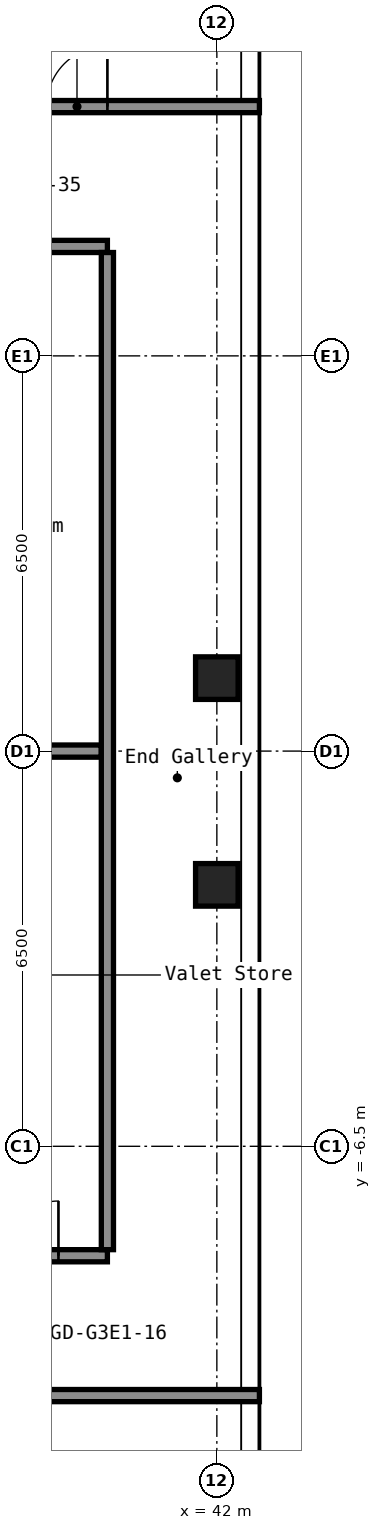
"""IFC4 building model, lengths in metres.
Left out: names, types, materials, properties, quantities, classifications, styles, units other than length and angle.
Written with IfcOpenShell. Run it as: python <this file> out.ifc"""

import sys

from ifc_helpers import new_model, si_unit, direction, frame, frame_2d, origin, origin_2d, place, context, subcontext, project, spatial, rectangle, hollow_rectangle, extrude, element, fill, save


model = new_model("IFC4")
c1 = context("Model", 3, precision=1e-05, world=origin(), true_north=direction((0.0, 1.0)))
c2 = subcontext(c1, "Body", "Model", "MODEL_VIEW")
j1 = project(units=[si_unit("LENGTHUNIT", "METRE"), si_unit("PLANEANGLEUNIT", "RADIAN")], contexts=[c1])
p1 = place(None, origin())
s1 = spatial("IfcSite", under=j1, at=p1, CompositionType="ELEMENT")
p2 = place(p1, origin())
s2 = spatial("IfcBuilding", under=s1, at=p2, CompositionType="ELEMENT")
p3 = place(p2, frame((0.0, 0.0, 159.8)))
s3 = spatial("IfcBuildingStorey", under=s2, at=p3, CompositionType="ELEMENT", Elevation=159.8)
for number, where, z_axis, x_axis in (
    (1, (42.0, -2.2, 0.0), (0.0, 0.0, 1.0), (1.0, 0.0, 0.0)),
    (2, (42.0, 1.2, 0.0), (0.0, 0.0, 1.0), (1.0, 0.0, 0.0)),
):
    element("IfcColumn", number, at=place(p3, frame(where, z_axis=z_axis, x_axis=x_axis)), inside=s3, PredefinedType="COLUMN", context=c2, shape_type="SweptSolid", body=[
        extrude(hollow_rectangle(XDim=0.7, YDim=0.7, WallThickness=0.028, at=origin_2d()), origin(), (0.0, 0.0, 1.0), 2.75),
    ])
p4 = place(p3, frame((16.8, -10.6, 0.0), z_axis=(0.0, 0.0, 1.0), x_axis=(1.0, 0.0, 0.0)))
e3 = element("IfcWall", 3, at=p4, inside=s3, PredefinedType="PARTITIONING", context=c2, shape_type="SweptSolid", body=[
    extrude(rectangle(XDim=25.9, YDim=0.2, at=frame_2d((12.95, 0.0))), origin(), (0.0, 0.0, 1.0), 2.75),
])
p5 = place(p4, frame((3.4, 0.0, 0.0)))
e4 = element("IfcOpeningElement", 4, at=p5, cuts=e3, PredefinedType="OPENING", context=c2, shape_type="SweptSolid", body=[
    extrude(rectangle(XDim=1.6, YDim=2.1, at=frame_2d((0.8, 1.05))), frame((0.0, 0.11, 0.0), z_axis=(0.0, -1.0, 0.0), x_axis=(1.0, 0.0, 0.0)), (0.0, 0.0, 1.0), 0.22),
])
p6 = place(p4, frame((11.8, 0.0, 0.0)))
e5 = element("IfcOpeningElement", 5, at=p6, cuts=e3, PredefinedType="OPENING", context=c2, shape_type="SweptSolid", body=[
    extrude(rectangle(XDim=1.6, YDim=2.1, at=frame_2d((0.8, 1.05))), frame((0.0, 0.11, 0.0), z_axis=(0.0, -1.0, 0.0), x_axis=(1.0, 0.0, 0.0)), (0.0, 0.0, 1.0), 0.22),
])
p7 = place(p4, frame((20.4, 0.0, 0.0)))
e6 = element("IfcOpeningElement", 6, at=p7, cuts=e3, PredefinedType="OPENING", context=c2, shape_type="SweptSolid", body=[
    extrude(rectangle(XDim=1.6, YDim=2.1, at=frame_2d((0.8, 1.05))), frame((0.0, 0.11, 0.0), z_axis=(0.0, -1.0, 0.0), x_axis=(1.0, 0.0, 0.0)), (0.0, 0.0, 1.0), 0.22),
])
p8 = place(p3, frame((33.6, -8.3, 0.0), z_axis=(0.0, 0.0, 1.0), x_axis=(1.0, 0.0, 0.0)))
e7 = element("IfcWall", 7, at=p8, inside=s3, PredefinedType="PARTITIONING", context=c2, shape_type="SweptSolid", body=[
    extrude(rectangle(XDim=6.6, YDim=0.2, at=frame_2d((3.3, 0.0))), origin(), (0.0, 0.0, 1.0), 2.75),
])
p9 = place(p8, frame((1.595, 0.0, 0.0)))
e8 = element("IfcOpeningElement", 8, at=p9, cuts=e7, PredefinedType="OPENING", context=c2, shape_type="SweptSolid", body=[
    extrude(rectangle(XDim=0.9, YDim=2.1, at=frame_2d((0.45, 1.05))), frame((0.0, 0.11, 0.0), z_axis=(0.0, -1.0, 0.0), x_axis=(1.0, 0.0, 0.0)), (0.0, 0.0, 1.0), 0.22),
])
p10 = place(p8, frame((4.895, 0.0, 0.0)))
e9 = element("IfcOpeningElement", 9, at=p10, cuts=e7, PredefinedType="OPENING", context=c2, shape_type="SweptSolid", body=[
    extrude(rectangle(XDim=0.9, YDim=2.1, at=frame_2d((0.45, 1.05))), frame((0.0, 0.11, 0.0), z_axis=(0.0, -1.0, 0.0), x_axis=(1.0, 0.0, 0.0)), (0.0, 0.0, 1.0), 0.22),
])
p11 = place(p3, frame((33.6, 0.0, 0.0), z_axis=(0.0, 0.0, 1.0), x_axis=(1.0, 0.0, 0.0)))
e10 = element("IfcWall", 10, at=p11, inside=s3, PredefinedType="PARTITIONING", context=c2, shape_type="SweptSolid", body=[
    extrude(rectangle(XDim=6.5, YDim=0.2, at=frame_2d((3.25, 0.0))), origin(), (0.0, 0.0, 1.0), 2.75),
])
p12 = place(p3, frame((33.6, 8.3, 0.0), z_axis=(0.0, 0.0, 1.0), x_axis=(1.0, 0.0, 0.0)))
e11 = element("IfcWall", 11, at=p12, inside=s3, PredefinedType="PARTITIONING", context=c2, shape_type="SweptSolid", body=[
    extrude(rectangle(XDim=6.6, YDim=0.2, at=frame_2d((3.3, 0.0))), origin(), (0.0, 0.0, 1.0), 2.75),
])
p13 = place(p12, frame((1.465, 0.0, 0.0)))
e12 = element("IfcOpeningElement", 12, at=p13, cuts=e11, PredefinedType="OPENING", context=c2, shape_type="SweptSolid", body=[
    extrude(rectangle(XDim=0.9, YDim=2.1, at=frame_2d((0.45, 1.05))), frame((0.0, 0.11, 0.0), z_axis=(0.0, -1.0, 0.0), x_axis=(1.0, 0.0, 0.0)), (0.0, 0.0, 1.0), 0.22),
])
p14 = place(p12, frame((4.765, 0.0, 0.0)))
e13 = element("IfcOpeningElement", 13, at=p14, cuts=e11, PredefinedType="OPENING", context=c2, shape_type="SweptSolid", body=[
    extrude(rectangle(XDim=0.9, YDim=2.1, at=frame_2d((0.45, 1.05))), frame((0.0, 0.11, 0.0), z_axis=(0.0, -1.0, 0.0), x_axis=(1.0, 0.0, 0.0)), (0.0, 0.0, 1.0), 0.22),
])
p15 = place(p3, frame((16.8, 10.6, 0.0), z_axis=(0.0, 0.0, 1.0), x_axis=(1.0, 0.0, 0.0)))
e14 = element("IfcWall", 14, at=p15, inside=s3, PredefinedType="PARTITIONING", context=c2, shape_type="SweptSolid", body=[
    extrude(rectangle(XDim=25.9, YDim=0.2, at=frame_2d((12.95, 0.0))), origin(), (0.0, 0.0, 1.0), 2.75),
])
p16 = place(p15, frame((2.0, 0.0, 0.0)))
e15 = element("IfcOpeningElement", 15, at=p16, cuts=e14, PredefinedType="OPENING", context=c2, shape_type="SweptSolid", body=[
    extrude(rectangle(XDim=1.0, YDim=2.1, at=frame_2d((0.5, 1.05))), frame((0.0, 0.11, 0.0), z_axis=(0.0, -1.0, 0.0), x_axis=(1.0, 0.0, 0.0)), (0.0, 0.0, 1.0), 0.22),
])
p17 = place(p15, frame((10.4, 0.0, 0.0)))
e16 = element("IfcOpeningElement", 16, at=p17, cuts=e14, PredefinedType="OPENING", context=c2, shape_type="SweptSolid", body=[
    extrude(rectangle(XDim=1.0, YDim=2.1, at=frame_2d((0.5, 1.05))), frame((0.0, 0.11, 0.0), z_axis=(0.0, -1.0, 0.0), x_axis=(1.0, 0.0, 0.0)), (0.0, 0.0, 1.0), 0.22),
])
p18 = place(p15, frame((22.4, 0.0, 0.0)))
e17 = element("IfcOpeningElement", 17, at=p18, cuts=e14, PredefinedType="OPENING", context=c2, shape_type="SweptSolid", body=[
    extrude(rectangle(XDim=1.0, YDim=2.1, at=frame_2d((0.5, 1.05))), frame((0.0, 0.11, 0.0), z_axis=(0.0, -1.0, 0.0), x_axis=(1.0, 0.0, 0.0)), (0.0, 0.0, 1.0), 0.22),
])
p19 = place(p3, frame((40.2, -8.2, 0.0), z_axis=(0.0, 0.0, 1.0), x_axis=(0.0, 1.0, 0.0)))
e18 = element("IfcWall", 18, at=p19, inside=s3, PredefinedType="PARTITIONING", context=c2, shape_type="SweptSolid", body=[
    extrude(rectangle(XDim=16.4, YDim=0.2, at=frame_2d((8.2, 0.0))), origin(), (0.0, 0.0, 1.0), 2.75),
])
p20 = place(p10, origin())
e19 = element("IfcDoor", 19, at=p20, inside=s3, OperationType="SINGLE_SWING_LEFT", PredefinedType="DOOR", context=c2, shape_type="SweptSolid", body=[
    extrude(rectangle(XDim=0.9, YDim=2.1, at=frame_2d((0.45, 1.05))), frame((0.0, 0.025, 0.0), z_axis=(0.0, -1.0, 0.0), x_axis=(1.0, 0.0, 0.0)), (0.0, 0.0, 1.0), 0.05),
])
fill(e9, e19)
p21 = place(p18, origin())
e20 = element("IfcDoor", 20, at=p21, inside=s3, OperationType="SINGLE_SWING_LEFT", PredefinedType="DOOR", context=c2, shape_type="SweptSolid", body=[
    extrude(rectangle(XDim=1.0, YDim=2.1, at=frame_2d((0.5, 1.05))), frame((0.0, 0.025, 0.0), z_axis=(0.0, -1.0, 0.0), x_axis=(1.0, 0.0, 0.0)), (0.0, 0.0, 1.0), 0.05),
])
fill(e17, e20)
save(model, sys.argv[1])
